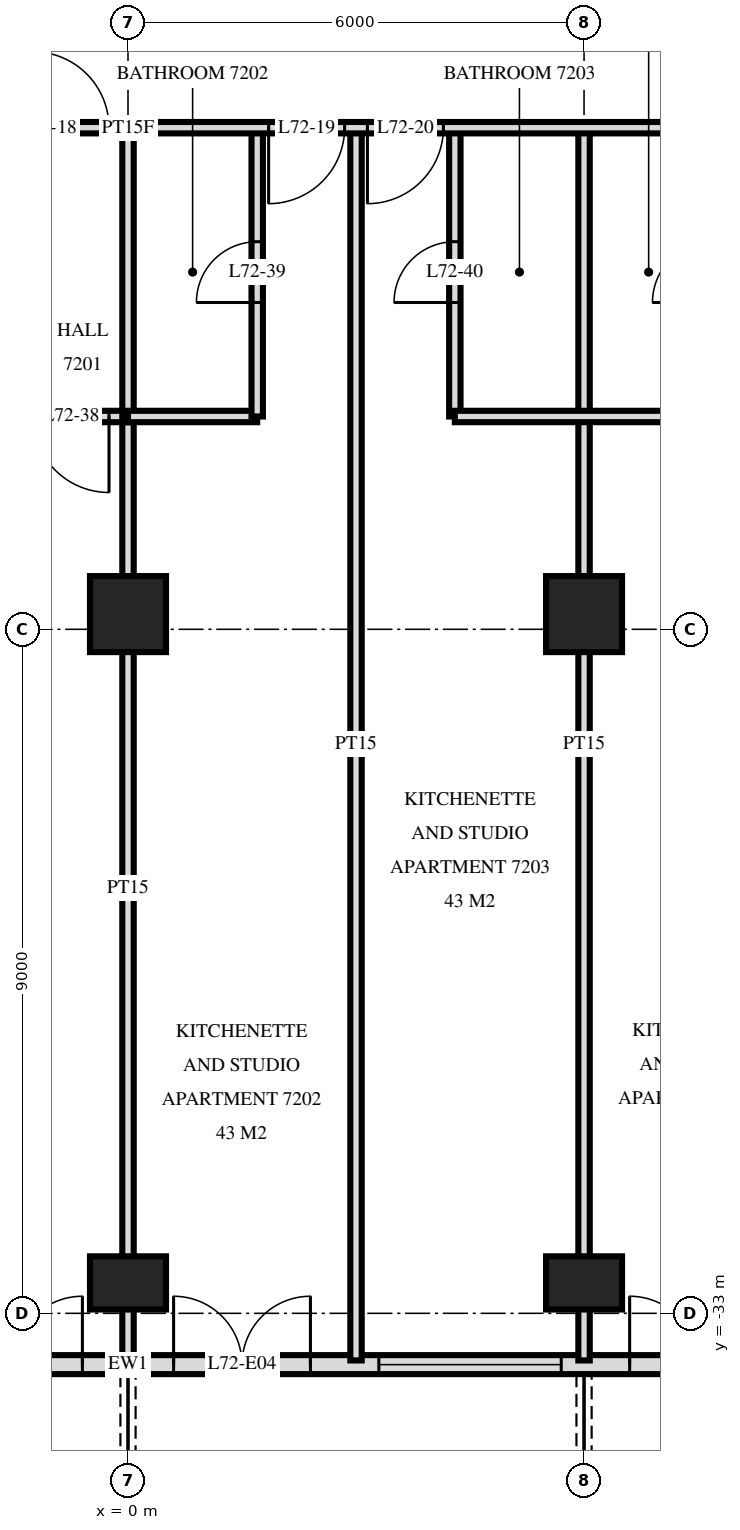
"""IFC4 building model, lengths in metres.
Left out: names, types, materials, properties, quantities, classifications, styles, units other than length and angle.
Written with IfcOpenShell. Run it as: python <this file> out.ifc"""

import sys

from ifc_helpers import new_model, si_unit, direction, frame, frame_2d, origin, origin_2d, place, context, subcontext, project, spatial, rectangle, extrude, element, fill, save


model = new_model("IFC4")
c1 = context("Model", 3, precision=1e-05, world=origin(), true_north=direction((0.0, 1.0)))
c2 = subcontext(c1, "Body", "Model", "MODEL_VIEW")
j1 = project(units=[si_unit("LENGTHUNIT", "METRE"), si_unit("PLANEANGLEUNIT", "RADIAN")], contexts=[c1])
p1 = place(None, origin())
s1 = spatial("IfcSite", under=j1, at=p1, CompositionType="ELEMENT")
p2 = place(p1, origin())
s2 = spatial("IfcBuilding", under=s1, at=p2, CompositionType="ELEMENT")
p3 = place(p2, frame((0.0, 0.0, 273.6)))
s3 = spatial("IfcBuildingStorey", under=s2, at=p3, CompositionType="ELEMENT", Elevation=273.6)
p4 = place(p3, frame((0.0, -32.6, 0.0), z_axis=(0.0, 0.0, 1.0), x_axis=(1.0, 0.0, 0.0)))
e1 = element("IfcColumn", 1, at=p4, inside=s3, PredefinedType="COLUMN", context=c2, shape_type="SweptSolid", body=[
    extrude(rectangle(XDim=1.0, YDim=0.7, at=origin_2d()), origin(), (0.0, 0.0, 1.0), 3.5),
])
p5 = place(p3, frame((0.0, -23.8, 0.0), z_axis=(0.0, 0.0, 1.0), x_axis=(1.0, 0.0, 0.0)))
e2 = element("IfcColumn", 2, at=p5, inside=s3, PredefinedType="COLUMN", context=c2, shape_type="SweptSolid", body=[
    extrude(rectangle(XDim=1.0, YDim=1.0, at=origin_2d()), origin(), (0.0, 0.0, 1.0), 3.5),
])
p6 = place(p3, frame((6.0, -32.6, 0.0), z_axis=(0.0, 0.0, 1.0), x_axis=(1.0, 0.0, 0.0)))
e3 = element("IfcColumn", 3, at=p6, inside=s3, PredefinedType="COLUMN", context=c2, shape_type="SweptSolid", body=[
    extrude(rectangle(XDim=1.0, YDim=0.7, at=origin_2d()), origin(), (0.0, 0.0, 1.0), 3.5),
])
p7 = place(p3, frame((6.0, -23.8, 0.0), z_axis=(0.0, 0.0, 1.0), x_axis=(1.0, 0.0, 0.0)))
e4 = element("IfcColumn", 4, at=p7, inside=s3, PredefinedType="COLUMN", context=c2, shape_type="SweptSolid", body=[
    extrude(rectangle(XDim=1.0, YDim=1.0, at=origin_2d()), origin(), (0.0, 0.0, 1.0), 3.5),
])
p8 = place(p3, frame((-18.575, -33.675, 0.0), z_axis=(0.0, 0.0, 1.0), x_axis=(1.0, 0.0, 0.0)))
e5 = element("IfcWall", 5, at=p8, inside=s3, PredefinedType="SOLIDWALL", context=c2, shape_type="SweptSolid", body=[
    extrude(rectangle(XDim=37.151, YDim=0.25, at=frame_2d((18.575, 0.0))), origin(), (0.0, 0.0, 1.0), 3.22),
])
p9 = place(p8, frame((4.175, 0.0, 0.0)))
e6 = element("IfcOpeningElement", 6, at=p9, cuts=e5, PredefinedType="OPENING", context=c2, shape_type="SweptSolid", body=[
    extrude(rectangle(XDim=1.8, YDim=2.4, at=frame_2d((0.9, 1.2))), frame((0.0, 0.135, 0.0), z_axis=(0.0, -1.0, 0.0), x_axis=(1.0, 0.0, 0.0)), (0.0, 0.0, 1.0), 0.27),
])
p10 = place(p8, frame((7.512, 0.0, 0.0)))
e7 = element("IfcOpeningElement", 7, at=p10, cuts=e5, PredefinedType="OPENING", context=c2, shape_type="SweptSolid", body=[
    extrude(rectangle(XDim=1.8, YDim=2.4, at=frame_2d((0.9, 1.2))), frame((0.0, 0.135, 0.0), z_axis=(0.0, -1.0, 0.0), x_axis=(1.0, 0.0, 0.0)), (0.0, 0.0, 1.0), 0.27),
])
p11 = place(p8, frame((10.287, 0.0, 0.9)))
e8 = element("IfcOpeningElement", 8, at=p11, cuts=e5, PredefinedType="OPENING", context=c2, shape_type="SweptSolid", body=[
    extrude(rectangle(XDim=1.8, YDim=1.5, at=frame_2d((0.9, 0.75))), frame((0.0, 0.135, 0.0), z_axis=(0.0, -1.0, 0.0), x_axis=(1.0, 0.0, 0.0)), (0.0, 0.0, 1.0), 0.27),
])
p12 = place(p8, frame((12.875, 0.0, 0.9)))
e9 = element("IfcOpeningElement", 9, at=p12, cuts=e5, PredefinedType="OPENING", context=c2, shape_type="SweptSolid", body=[
    extrude(rectangle(XDim=2.4, YDim=1.5, at=frame_2d((1.2, 0.75))), frame((0.0, 0.135, 0.0), z_axis=(0.0, -1.0, 0.0), x_axis=(1.0, 0.0, 0.0)), (0.0, 0.0, 1.0), 0.27),
])
p13 = place(p8, frame((16.175, 0.0, 0.0)))
e10 = element("IfcOpeningElement", 10, at=p13, cuts=e5, PredefinedType="OPENING", context=c2, shape_type="SweptSolid", body=[
    extrude(rectangle(XDim=1.8, YDim=2.4, at=frame_2d((0.9, 1.2))), frame((0.0, 0.135, 0.0), z_axis=(0.0, -1.0, 0.0), x_axis=(1.0, 0.0, 0.0)), (0.0, 0.0, 1.0), 0.27),
])
p14 = place(p8, frame((19.175, 0.0, 0.0)))
e11 = element("IfcOpeningElement", 11, at=p14, cuts=e5, PredefinedType="OPENING", context=c2, shape_type="SweptSolid", body=[
    extrude(rectangle(XDim=1.8, YDim=2.4, at=frame_2d((0.9, 1.2))), frame((0.0, 0.135, 0.0), z_axis=(0.0, -1.0, 0.0), x_axis=(1.0, 0.0, 0.0)), (0.0, 0.0, 1.0), 0.27),
])
p15 = place(p8, frame((21.875, 0.0, 0.9)))
e12 = element("IfcOpeningElement", 12, at=p15, cuts=e5, PredefinedType="OPENING", context=c2, shape_type="SweptSolid", body=[
    extrude(rectangle(XDim=2.4, YDim=1.5, at=frame_2d((1.2, 0.75))), frame((0.0, 0.135, 0.0), z_axis=(0.0, -1.0, 0.0), x_axis=(1.0, 0.0, 0.0)), (0.0, 0.0, 1.0), 0.27),
])
p16 = place(p8, frame((25.175, 0.0, 0.0)))
e13 = element("IfcOpeningElement", 13, at=p16, cuts=e5, PredefinedType="OPENING", context=c2, shape_type="SweptSolid", body=[
    extrude(rectangle(XDim=1.8, YDim=2.4, at=frame_2d((0.9, 1.2))), frame((0.0, 0.135, 0.0), z_axis=(0.0, -1.0, 0.0), x_axis=(1.0, 0.0, 0.0)), (0.0, 0.0, 1.0), 0.27),
])
p17 = place(p8, frame((27.875, 0.0, 0.9)))
e14 = element("IfcOpeningElement", 14, at=p17, cuts=e5, PredefinedType="OPENING", context=c2, shape_type="SweptSolid", body=[
    extrude(rectangle(XDim=2.4, YDim=1.5, at=frame_2d((1.2, 0.75))), frame((0.0, 0.135, 0.0), z_axis=(0.0, -1.0, 0.0), x_axis=(1.0, 0.0, 0.0)), (0.0, 0.0, 1.0), 0.27),
])
p18 = place(p8, frame((30.95, 0.0, 0.9)))
e15 = element("IfcOpeningElement", 15, at=p18, cuts=e5, PredefinedType="OPENING", context=c2, shape_type="SweptSolid", body=[
    extrude(rectangle(XDim=1.8, YDim=1.5, at=frame_2d((0.9, 0.75))), frame((0.0, 0.135, 0.0), z_axis=(0.0, -1.0, 0.0), x_axis=(1.0, 0.0, 0.0)), (0.0, 0.0, 1.0), 0.27),
])
p19 = place(p8, frame((34.175, 0.0, 0.0)))
e16 = element("IfcOpeningElement", 16, at=p19, cuts=e5, PredefinedType="OPENING", context=c2, shape_type="SweptSolid", body=[
    extrude(rectangle(XDim=1.8, YDim=2.4, at=frame_2d((0.9, 1.2))), frame((0.0, 0.135, 0.0), z_axis=(0.0, -1.0, 0.0), x_axis=(1.0, 0.0, 0.0)), (0.0, 0.0, 1.0), 0.27),
])
p20 = place(p3, frame((6.0, -33.62, 0.0), z_axis=(0.0, 0.0, 1.0), x_axis=(0.0, 1.0, 0.0)))
e17 = element("IfcWall", 17, at=p20, inside=s3, PredefinedType="PARTITIONING", context=c2, shape_type="SweptSolid", body=[
    extrude(rectangle(XDim=16.22, YDim=0.15, at=frame_2d((8.11, 0.0))), origin(), (0.0, 0.0, 1.0), 3.22),
])
p21 = place(p3, frame((4.3, -21.2, 0.0), z_axis=(0.0, 0.0, 1.0), x_axis=(0.0, 1.0, 0.0)))
e18 = element("IfcWall", 18, at=p21, inside=s3, PredefinedType="PARTITIONING", context=c2, shape_type="SweptSolid", body=[
    extrude(rectangle(XDim=3.8, YDim=0.15, at=frame_2d((1.9, 0.0))), origin(), (0.0, 0.0, 1.0), 3.22),
])
p22 = place(p21, frame((1.5, 0.0, 0.0)))
e19 = element("IfcOpeningElement", 19, at=p22, cuts=e18, PredefinedType="OPENING", context=c2, shape_type="SweptSolid", body=[
    extrude(rectangle(XDim=0.8, YDim=2.1, at=frame_2d((0.4, 1.05))), frame((0.0, 0.085, 0.0), z_axis=(0.0, -1.0, 0.0), x_axis=(1.0, 0.0, 0.0)), (0.0, 0.0, 1.0), 0.17),
])
p23 = place(p3, frame((3.0, -33.62, 0.0), z_axis=(0.0, 0.0, 1.0), x_axis=(0.0, 1.0, 0.0)))
e20 = element("IfcWall", 20, at=p23, inside=s3, PredefinedType="PARTITIONING", context=c2, shape_type="SweptSolid", body=[
    extrude(rectangle(XDim=16.22, YDim=0.15, at=frame_2d((8.11, 0.0))), origin(), (0.0, 0.0, 1.0), 3.22),
])
p24 = place(p3, frame((1.7, -21.2, 0.0), z_axis=(0.0, 0.0, 1.0), x_axis=(0.0, 1.0, 0.0)))
e21 = element("IfcWall", 21, at=p24, inside=s3, PredefinedType="PARTITIONING", context=c2, shape_type="SweptSolid", body=[
    extrude(rectangle(XDim=3.8, YDim=0.15, at=frame_2d((1.9, 0.0))), origin(), (0.0, 0.0, 1.0), 3.22),
])
p25 = place(p24, frame((1.5, 0.0, 0.0)))
e22 = element("IfcOpeningElement", 22, at=p25, cuts=e21, PredefinedType="OPENING", context=c2, shape_type="SweptSolid", body=[
    extrude(rectangle(XDim=0.8, YDim=2.1, at=frame_2d((0.4, 1.05))), frame((0.0, 0.085, 0.0), z_axis=(0.0, -1.0, 0.0), x_axis=(1.0, 0.0, 0.0)), (0.0, 0.0, 1.0), 0.17),
])
p26 = place(p3, frame((0.0, -21.2, 0.0), z_axis=(0.0, 0.0, 1.0), x_axis=(0.0, 1.0, 0.0)))
e23 = element("IfcWall", 23, at=p26, inside=s3, PredefinedType="PARTITIONING", context=c2, shape_type="SweptSolid", body=[
    extrude(rectangle(XDim=3.8, YDim=0.15, at=frame_2d((1.9, 0.0))), origin(), (0.0, 0.0, 1.0), 3.22),
])
p27 = place(p3, frame((0.0, -33.62, 0.0), z_axis=(0.0, 0.0, 1.0), x_axis=(0.0, 1.0, 0.0)))
e24 = element("IfcWall", 24, at=p27, inside=s3, PredefinedType="PARTITIONING", context=c2, shape_type="SweptSolid", body=[
    extrude(rectangle(XDim=12.42, YDim=0.15, at=frame_2d((6.21, 0.0))), origin(), (0.0, 0.0, 1.0), 3.22),
])
p28 = place(p3, frame((-1.5, -21.2, 0.0), z_axis=(0.0, 0.0, 1.0), x_axis=(1.0, 0.0, 0.0)))
e25 = element("IfcWall", 25, at=p28, inside=s3, PredefinedType="PARTITIONING", context=c2, shape_type="SweptSolid", body=[
    extrude(rectangle(XDim=1.5, YDim=0.15, at=frame_2d((0.75, 0.0))), origin(), (0.0, 0.0, 1.0), 3.22),
])
p29 = place(p28, frame((0.25, 0.0, 0.0)))
e26 = element("IfcOpeningElement", 26, at=p29, cuts=e25, PredefinedType="OPENING", context=c2, shape_type="SweptSolid", body=[
    extrude(rectangle(XDim=1.0, YDim=2.1, at=frame_2d((0.5, 1.05))), frame((0.0, 0.085, 0.0), z_axis=(0.0, -1.0, 0.0), x_axis=(1.0, 0.0, 0.0)), (0.0, 0.0, 1.0), 0.17),
])
p30 = place(p3, frame((0.0, -21.2, 0.0), z_axis=(0.0, 0.0, 1.0), x_axis=(1.0, 0.0, 0.0)))
e27 = element("IfcWall", 27, at=p30, inside=s3, PredefinedType="PARTITIONING", context=c2, shape_type="SweptSolid", body=[
    extrude(rectangle(XDim=1.7, YDim=0.15, at=frame_2d((0.85, 0.0))), origin(), (0.0, 0.0, 1.0), 3.22),
])
p31 = place(p3, frame((4.3, -21.2, 0.0), z_axis=(0.0, 0.0, 1.0), x_axis=(1.0, 0.0, 0.0)))
e28 = element("IfcWall", 28, at=p31, inside=s3, PredefinedType="PARTITIONING", context=c2, shape_type="SweptSolid", body=[
    extrude(rectangle(XDim=3.4, YDim=0.15, at=frame_2d((1.7, 0.0))), origin(), (0.0, 0.0, 1.0), 3.22),
])
p32 = place(p3, frame((-22.92, -17.4, 0.0), z_axis=(0.0, 0.0, 1.0), x_axis=(1.0, 0.0, 0.0)))
e29 = element("IfcWall", 29, at=p32, inside=s3, PredefinedType="PARTITIONING", context=c2, shape_type="SweptSolid", body=[
    extrude(rectangle(XDim=45.84, YDim=0.15, at=frame_2d((22.92, 0.0))), origin(), (0.0, 0.0, 1.0), 3.22),
])
p33 = place(p32, frame((21.67, 0.0, 0.0)))
e30 = element("IfcOpeningElement", 30, at=p33, cuts=e29, PredefinedType="OPENING", context=c2, shape_type="SweptSolid", body=[
    extrude(rectangle(XDim=1.0, YDim=2.1, at=frame_2d((0.5, 1.05))), frame((0.0, 0.085, 0.0), z_axis=(0.0, -1.0, 0.0), x_axis=(1.0, 0.0, 0.0)), (0.0, 0.0, 1.0), 0.17),
])
p34 = place(p32, frame((24.77, 0.0, 0.0)))
e31 = element("IfcOpeningElement", 31, at=p34, cuts=e29, PredefinedType="OPENING", context=c2, shape_type="SweptSolid", body=[
    extrude(rectangle(XDim=1.0, YDim=2.1, at=frame_2d((0.5, 1.05))), frame((0.0, 0.085, 0.0), z_axis=(0.0, -1.0, 0.0), x_axis=(1.0, 0.0, 0.0)), (0.0, 0.0, 1.0), 0.17),
])
p35 = place(p32, frame((26.07, 0.0, 0.0)))
e32 = element("IfcOpeningElement", 32, at=p35, cuts=e29, PredefinedType="OPENING", context=c2, shape_type="SweptSolid", body=[
    extrude(rectangle(XDim=1.0, YDim=2.1, at=frame_2d((0.5, 1.05))), frame((0.0, 0.085, 0.0), z_axis=(0.0, -1.0, 0.0), x_axis=(1.0, 0.0, 0.0)), (0.0, 0.0, 1.0), 0.17),
])
p36 = place(p32, frame((30.77, 0.0, 0.0)))
e33 = element("IfcOpeningElement", 33, at=p36, cuts=e29, PredefinedType="OPENING", context=c2, shape_type="SweptSolid", body=[
    extrude(rectangle(XDim=1.0, YDim=2.1, at=frame_2d((0.5, 1.05))), frame((0.0, 0.085, 0.0), z_axis=(0.0, -1.0, 0.0), x_axis=(1.0, 0.0, 0.0)), (0.0, 0.0, 1.0), 0.17),
])
p37 = place(p32, frame((32.07, 0.0, 0.0)))
e34 = element("IfcOpeningElement", 34, at=p37, cuts=e29, PredefinedType="OPENING", context=c2, shape_type="SweptSolid", body=[
    extrude(rectangle(XDim=1.0, YDim=2.1, at=frame_2d((0.5, 1.05))), frame((0.0, 0.085, 0.0), z_axis=(0.0, -1.0, 0.0), x_axis=(1.0, 0.0, 0.0)), (0.0, 0.0, 1.0), 0.17),
])
p38 = place(p32, frame((9.42, 0.0, 0.0)))
e35 = element("IfcOpeningElement", 35, at=p38, cuts=e29, PredefinedType="OPENING", context=c2, shape_type="SweptSolid", body=[
    extrude(rectangle(XDim=1.0, YDim=2.1, at=frame_2d((0.5, 1.05))), frame((0.0, 0.085, 0.0), z_axis=(0.0, -1.0, 0.0), x_axis=(1.0, 0.0, 0.0)), (0.0, 0.0, 1.0), 0.17),
])
p39 = place(p32, frame((2.67, 0.0, 0.0)))
e36 = element("IfcOpeningElement", 36, at=p39, cuts=e29, PredefinedType="OPENING", context=c2, shape_type="SweptSolid", body=[
    extrude(rectangle(XDim=1.0, YDim=2.1, at=frame_2d((0.5, 1.05))), frame((0.0, 0.085, 0.0), z_axis=(0.0, -1.0, 0.0), x_axis=(1.0, 0.0, 0.0)), (0.0, 0.0, 1.0), 0.17),
])
p40 = place(p32, frame((37.82, 0.0, 0.0)))
e37 = element("IfcOpeningElement", 37, at=p40, cuts=e29, PredefinedType="OPENING", context=c2, shape_type="SweptSolid", body=[
    extrude(rectangle(XDim=1.0, YDim=2.1, at=frame_2d((0.5, 1.05))), frame((0.0, 0.085, 0.0), z_axis=(0.0, -1.0, 0.0), x_axis=(1.0, 0.0, 0.0)), (0.0, 0.0, 1.0), 0.17),
])
p41 = place(p13, origin())
e38 = element("IfcDoor", 38, at=p41, inside=s3, OperationType="DOUBLE_DOOR_SINGLE_SWING", PredefinedType="DOOR", context=c2, shape_type="SweptSolid", body=[
    extrude(rectangle(XDim=1.8, YDim=2.4, at=frame_2d((0.9, 1.2))), frame((0.0, 0.025, 0.0), z_axis=(0.0, -1.0, 0.0), x_axis=(1.0, 0.0, 0.0)), (0.0, 0.0, 1.0), 0.05),
])
fill(e10, e38)
p42 = place(p14, origin())
e39 = element("IfcDoor", 39, at=p42, inside=s3, OperationType="DOUBLE_DOOR_SINGLE_SWING", PredefinedType="DOOR", context=c2, shape_type="SweptSolid", body=[
    extrude(rectangle(XDim=1.8, YDim=2.4, at=frame_2d((0.9, 1.2))), frame((0.0, 0.025, 0.0), z_axis=(0.0, -1.0, 0.0), x_axis=(1.0, 0.0, 0.0)), (0.0, 0.0, 1.0), 0.05),
])
fill(e11, e39)
p43 = place(p15, origin())
e40 = element("IfcWindow", 40, at=p43, inside=s3, PartitioningType="SINGLE_PANEL", PredefinedType="WINDOW", context=c2, shape_type="SweptSolid", body=[
    extrude(rectangle(XDim=2.4, YDim=1.5, at=frame_2d((1.2, 0.75))), frame((0.0, 0.03, 0.0), z_axis=(0.0, -1.0, 0.0), x_axis=(1.0, 0.0, 0.0)), (0.0, 0.0, 1.0), 0.06),
])
fill(e12, e40)
p44 = place(p16, origin())
e41 = element("IfcDoor", 41, at=p44, inside=s3, OperationType="DOUBLE_DOOR_SINGLE_SWING", PredefinedType="DOOR", context=c2, shape_type="SweptSolid", body=[
    extrude(rectangle(XDim=1.8, YDim=2.4, at=frame_2d((0.9, 1.2))), frame((0.0, 0.025, 0.0), z_axis=(0.0, -1.0, 0.0), x_axis=(1.0, 0.0, 0.0)), (0.0, 0.0, 1.0), 0.05),
])
fill(e13, e41)
p45 = place(p33, origin())
e42 = element("IfcDoor", 42, at=p45, inside=s3, OperationType="SINGLE_SWING_RIGHT", PredefinedType="DOOR", context=c2, shape_type="SweptSolid", body=[
    extrude(rectangle(XDim=1.0, YDim=2.1, at=frame_2d((0.5, 1.05))), frame((0.0, 0.025, 0.0), z_axis=(0.0, -1.0, 0.0), x_axis=(1.0, 0.0, 0.0)), (0.0, 0.0, 1.0), 0.05),
])
fill(e30, e42)
p46 = place(p34, frame((0.5, 0.0, 0.0), z_axis=(0.0, 0.0, 1.0), x_axis=(-1.0, 0.0, 0.0)))
e43 = element("IfcDoor", 43, at=p46, inside=s3, OperationType="SINGLE_SWING_LEFT", PredefinedType="DOOR", context=c2, shape_type="SweptSolid", body=[
    extrude(rectangle(XDim=1.0, YDim=2.1, at=frame_2d((0.0, 1.05))), frame((0.0, -0.025, 0.0), z_axis=(0.0, 1.0, 0.0), x_axis=(-1.0, 0.0, 0.0)), (0.0, 0.0, 1.0), 0.05),
])
fill(e31, e43)
p47 = place(p35, frame((0.5, 0.0, 0.0), z_axis=(0.0, 0.0, 1.0), x_axis=(-1.0, 0.0, 0.0)))
e44 = element("IfcDoor", 44, at=p47, inside=s3, OperationType="SINGLE_SWING_LEFT", PredefinedType="DOOR", context=c2, shape_type="SweptSolid", body=[
    extrude(rectangle(XDim=1.0, YDim=2.1, at=frame_2d((0.0, 1.05))), frame((0.0, -0.025, 0.0), z_axis=(0.0, 1.0, 0.0), x_axis=(-1.0, 0.0, 0.0)), (0.0, 0.0, 1.0), 0.05),
])
fill(e32, e44)
p48 = place(p29, frame((0.5, 0.0, 0.0), z_axis=(0.0, 0.0, 1.0), x_axis=(-1.0, 0.0, 0.0)))
e45 = element("IfcDoor", 45, at=p48, inside=s3, OperationType="SINGLE_SWING_RIGHT", PredefinedType="DOOR", context=c2, shape_type="SweptSolid", body=[
    extrude(rectangle(XDim=1.0, YDim=2.1, at=frame_2d((0.0, 1.05))), frame((0.0, -0.025, 0.0), z_axis=(0.0, 1.0, 0.0), x_axis=(-1.0, 0.0, 0.0)), (0.0, 0.0, 1.0), 0.05),
])
fill(e26, e45)
p49 = place(p25, origin())
e46 = element("IfcDoor", 46, at=p49, inside=s3, OperationType="SINGLE_SWING_RIGHT", PredefinedType="DOOR", context=c2, shape_type="SweptSolid", body=[
    extrude(rectangle(XDim=0.8, YDim=2.1, at=frame_2d((0.4, 1.05))), frame((0.0, 0.025, 0.0), z_axis=(0.0, -1.0, 0.0), x_axis=(1.0, 0.0, 0.0)), (0.0, 0.0, 1.0), 0.05),
])
fill(e22, e46)
p50 = place(p22, origin())
e47 = element("IfcDoor", 47, at=p50, inside=s3, OperationType="SINGLE_SWING_RIGHT", PredefinedType="DOOR", context=c2, shape_type="SweptSolid", body=[
    extrude(rectangle(XDim=0.8, YDim=2.1, at=frame_2d((0.4, 1.05))), frame((0.0, 0.025, 0.0), z_axis=(0.0, -1.0, 0.0), x_axis=(1.0, 0.0, 0.0)), (0.0, 0.0, 1.0), 0.05),
])
fill(e19, e47)
save(model, sys.argv[1])
